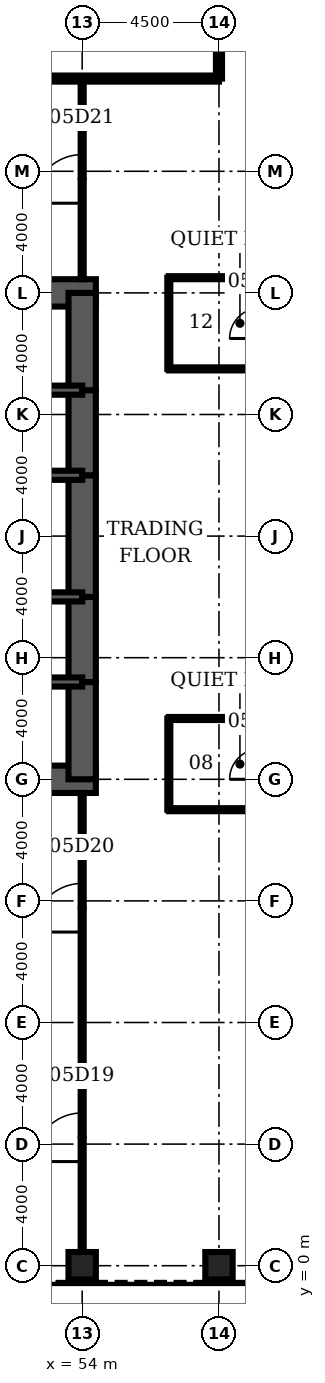
"""IFC4 building model, lengths in metres.
Left out: names, types, materials, properties, quantities, classifications, styles, units other than length and angle.
Written with IfcOpenShell. Run it as: python <this file> out.ifc"""

import sys

from ifc_helpers import new_model, si_unit, direction, frame, frame_2d, origin, origin_2d, place, context, subcontext, project, spatial, rectangle, hollow_rectangle, extrude, element, fill, save


model = new_model("IFC4")
c1 = context("Model", 3, precision=1e-05, world=origin(), true_north=direction((0.0, 1.0)))
c2 = subcontext(c1, "Body", "Model", "MODEL_VIEW")
j1 = project(units=[si_unit("LENGTHUNIT", "METRE"), si_unit("PLANEANGLEUNIT", "RADIAN")], contexts=[c1])
p1 = place(None, origin())
s1 = spatial("IfcSite", under=j1, at=p1, CompositionType="ELEMENT")
p2 = place(p1, origin())
s2 = spatial("IfcBuilding", under=s1, at=p2, CompositionType="ELEMENT")
p3 = place(p2, frame((0.0, 0.0, 27.5)))
s3 = spatial("IfcBuildingStorey", under=s2, at=p3, CompositionType="ELEMENT", Elevation=27.5)
for number, where, z_axis, x_axis in (
    (1, (54.0, 0.0, 0.0), (0.0, 0.0, 1.0), (0.0, 1.0, 0.0)),
    (2, (58.5, 0.0, 0.0), (0.0, 0.0, 1.0), (0.0, 1.0, 0.0)),
):
    element("IfcColumn", number, at=place(p3, frame(where, z_axis=z_axis, x_axis=x_axis)), inside=s3, PredefinedType="COLUMN", context=c2, shape_type="SweptSolid", body=[
        extrude(hollow_rectangle(XDim=0.9, YDim=0.9, WallThickness=0.12, at=origin_2d()), origin(), (0.0, 0.0, 1.0), 4.5),
    ])
for number, where, z_axis, x_axis in (
    (3, (45.0, 16.0, 0.0), (0.0, 0.0, 1.0), (1.0, 0.0, 0.0)),
    (4, (54.45, 32.0, 0.0), (0.0, 0.0, 1.0), (-1.0, 0.0, 0.0)),
):
    element("IfcWall", number, at=place(p3, frame(where, z_axis=z_axis, x_axis=x_axis)), inside=s3, PredefinedType="SHEAR", context=c2, shape_type="SweptSolid", body=[
        extrude(rectangle(XDim=9.45, YDim=0.9, at=frame_2d((4.725, 0.0))), origin(), (0.0, 0.0, 1.0), 4.5),
    ])
p4 = place(p3, frame((54.0, 16.0, 0.0), z_axis=(0.0, 0.0, 1.0), x_axis=(0.0, 1.0, 0.0)))
e5 = element("IfcWall", 5, at=p4, inside=s3, PredefinedType="SHEAR", context=c2, shape_type="SweptSolid", body=[
    extrude(rectangle(XDim=3.2, YDim=0.9, at=frame_2d((1.6, 0.0))), origin(), (0.0, 0.0, 1.0), 4.5),
])
p5 = place(p3, frame((54.0, 19.2, 0.0), z_axis=(0.0, 0.0, 1.0), x_axis=(0.0, 1.0, 0.0)))
e6 = element("IfcWall", 6, at=p5, inside=s3, PredefinedType="SHEAR", context=c2, shape_type="SweptSolid", body=[
    extrude(rectangle(XDim=2.8, YDim=0.9, at=frame_2d((1.4, 0.0))), origin(), (0.0, 0.0, 1.0), 4.5),
])
p6 = place(p5, frame((0.4, 0.0, 0.0)))
e7 = element("IfcOpeningElement", 7, at=p6, cuts=e6, PredefinedType="OPENING", context=c2, shape_type="SweptSolid", body=[
    extrude(rectangle(XDim=1.8, YDim=2.1, at=frame_2d((0.9, 1.05))), frame((0.0, 0.46, 0.0), z_axis=(0.0, -1.0, 0.0), x_axis=(1.0, 0.0, 0.0)), (0.0, 0.0, 1.0), 0.92),
])
p7 = place(p3, frame((54.0, 22.0, 0.0), z_axis=(0.0, 0.0, 1.0), x_axis=(0.0, 1.0, 0.0)))
e8 = element("IfcWall", 8, at=p7, inside=s3, PredefinedType="SHEAR", context=c2, shape_type="SweptSolid", body=[
    extrude(rectangle(XDim=4.0, YDim=0.9, at=frame_2d((2.0, 0.0))), origin(), (0.0, 0.0, 1.0), 4.5),
])
p8 = place(p3, frame((54.0, 26.0, 0.0), z_axis=(0.0, 0.0, 1.0), x_axis=(0.0, 1.0, 0.0)))
e9 = element("IfcWall", 9, at=p8, inside=s3, PredefinedType="SHEAR", context=c2, shape_type="SweptSolid", body=[
    extrude(rectangle(XDim=2.8, YDim=0.9, at=frame_2d((1.4, 0.0))), origin(), (0.0, 0.0, 1.0), 4.5),
])
p9 = place(p8, frame((0.6, 0.0, 0.0)))
e10 = element("IfcOpeningElement", 10, at=p9, cuts=e9, PredefinedType="OPENING", context=c2, shape_type="SweptSolid", body=[
    extrude(rectangle(XDim=1.8, YDim=2.1, at=frame_2d((0.9, 1.05))), frame((0.0, 0.46, 0.0), z_axis=(0.0, -1.0, 0.0), x_axis=(1.0, 0.0, 0.0)), (0.0, 0.0, 1.0), 0.92),
])
p10 = place(p3, frame((54.0, 28.8, 0.0), z_axis=(0.0, 0.0, 1.0), x_axis=(0.0, 1.0, 0.0)))
e11 = element("IfcWall", 11, at=p10, inside=s3, PredefinedType="SHEAR", context=c2, shape_type="SweptSolid", body=[
    extrude(rectangle(XDim=3.2, YDim=0.9, at=frame_2d((1.6, 0.0))), origin(), (0.0, 0.0, 1.0), 4.5),
])
p11 = place(p3, frame((45.0, 19.2, 0.0), z_axis=(0.0, 0.0, 1.0), x_axis=(1.0, 0.0, 0.0)))
e12 = element("IfcWall", 12, at=p11, inside=s3, PredefinedType="SOLIDWALL", context=c2, shape_type="SweptSolid", body=[
    extrude(rectangle(XDim=9.0, YDim=0.3, at=frame_2d((4.5, 0.0))), origin(), (0.0, 0.0, 1.0), 4.5),
])
p12 = place(p11, frame((7.35, 0.0, 0.0)))
e13 = element("IfcOpeningElement", 13, at=p12, cuts=e12, PredefinedType="OPENING", context=c2, shape_type="SweptSolid", body=[
    extrude(rectangle(XDim=1.0, YDim=2.1, at=frame_2d((0.5, 1.05))), frame((0.0, 0.16, 0.0), z_axis=(0.0, -1.0, 0.0), x_axis=(1.0, 0.0, 0.0)), (0.0, 0.0, 1.0), 0.32),
])
p13 = place(p3, frame((45.0, 28.8, 0.0), z_axis=(0.0, 0.0, 1.0), x_axis=(1.0, 0.0, 0.0)))
e14 = element("IfcWall", 14, at=p13, inside=s3, PredefinedType="SOLIDWALL", context=c2, shape_type="SweptSolid", body=[
    extrude(rectangle(XDim=9.0, YDim=0.3, at=frame_2d((4.5, 0.0))), origin(), (0.0, 0.0, 1.0), 4.5),
])
p14 = place(p13, frame((7.35, 0.0, 0.0)))
e15 = element("IfcOpeningElement", 15, at=p14, cuts=e14, PredefinedType="OPENING", context=c2, shape_type="SweptSolid", body=[
    extrude(rectangle(XDim=1.0, YDim=2.1, at=frame_2d((0.5, 1.05))), frame((0.0, 0.16, 0.0), z_axis=(0.0, -1.0, 0.0), x_axis=(1.0, 0.0, 0.0)), (0.0, 0.0, 1.0), 0.32),
])
p15 = place(p3, frame((48.0, 22.0, 0.0), z_axis=(0.0, 0.0, 1.0), x_axis=(1.0, 0.0, 0.0)))
e16 = element("IfcWall", 16, at=p15, inside=s3, PredefinedType="SOLIDWALL", context=c2, shape_type="SweptSolid", body=[
    extrude(rectangle(XDim=6.0, YDim=0.3, at=frame_2d((3.0, 0.0))), origin(), (0.0, 0.0, 1.0), 4.5),
])
p16 = place(p15, frame((2.0, 0.0, 0.0)))
e17 = element("IfcOpeningElement", 17, at=p16, cuts=e16, PredefinedType="OPENING", context=c2, shape_type="SweptSolid", body=[
    extrude(rectangle(XDim=1.0, YDim=2.1, at=frame_2d((0.5, 1.05))), frame((0.0, 0.16, 0.0), z_axis=(0.0, -1.0, 0.0), x_axis=(1.0, 0.0, 0.0)), (0.0, 0.0, 1.0), 0.32),
])
p17 = place(p15, frame((4.3, 0.0, 0.0)))
e18 = element("IfcOpeningElement", 18, at=p17, cuts=e16, PredefinedType="OPENING", context=c2, shape_type="SweptSolid", body=[
    extrude(rectangle(XDim=1.0, YDim=2.1, at=frame_2d((0.5, 1.05))), frame((0.0, 0.16, 0.0), z_axis=(0.0, -1.0, 0.0), x_axis=(1.0, 0.0, 0.0)), (0.0, 0.0, 1.0), 0.32),
])
p18 = place(p3, frame((48.0, 26.0, 0.0), z_axis=(0.0, 0.0, 1.0), x_axis=(1.0, 0.0, 0.0)))
e19 = element("IfcWall", 19, at=p18, inside=s3, PredefinedType="SOLIDWALL", context=c2, shape_type="SweptSolid", body=[
    extrude(rectangle(XDim=6.0, YDim=0.3, at=frame_2d((3.0, 0.0))), origin(), (0.0, 0.0, 1.0), 4.5),
])
for number, where, z_axis, x_axis in (
    (20, (56.85, 15.0, 0.0), (0.0, 0.0, 1.0), (1.0, 0.0, 0.0)),
    (21, (56.85, 18.0, 0.0), (0.0, 0.0, 1.0), (1.0, 0.0, 0.0)),
    (22, (56.85, 29.5, 0.0), (0.0, 0.0, 1.0), (1.0, 0.0, 0.0)),
    (23, (56.85, 32.5, 0.0), (0.0, 0.0, 1.0), (1.0, 0.0, 0.0)),
):
    element("IfcWall", number, at=place(p3, frame(where, z_axis=z_axis, x_axis=x_axis)), inside=s3, PredefinedType="PARTITIONING", context=c2, shape_type="SweptSolid", body=[
        extrude(rectangle(XDim=3.0, YDim=0.1, at=frame_2d((1.5, 0.0))), origin(), (0.0, 0.0, 1.0), 3.0),
    ])
p19 = place(p3, frame((49.5, 39.05, 0.0), z_axis=(0.0, 0.0, 1.0), x_axis=(1.0, 0.0, 0.0)))
e24 = element("IfcWall", 24, at=p19, inside=s3, PredefinedType="PARTITIONING", context=c2, shape_type="SweptSolid", body=[
    extrude(rectangle(XDim=9.0, YDim=0.2, at=frame_2d((4.5, 0.0))), origin(), (0.0, 0.0, 1.0), 3.0),
])
p20 = place(p19, frame((0.45, 0.0, 0.0)))
e25 = element("IfcOpeningElement", 25, at=p20, cuts=e24, PredefinedType="OPENING", context=c2, shape_type="SweptSolid", body=[
    extrude(rectangle(XDim=1.6, YDim=2.1, at=frame_2d((0.8, 1.05))), frame((0.0, 0.11, 0.0), z_axis=(0.0, -1.0, 0.0), x_axis=(1.0, 0.0, 0.0)), (0.0, 0.0, 1.0), 0.22),
])
p21 = place(p3, frame((54.0, 0.45, 0.0), z_axis=(0.0, 0.0, 1.0), x_axis=(0.0, 1.0, 0.0)))
e26 = element("IfcWall", 26, at=p21, inside=s3, PredefinedType="PARTITIONING", context=c2, shape_type="SweptSolid", body=[
    extrude(rectangle(XDim=15.1, YDim=0.1, at=frame_2d((7.55, 0.0))), origin(), (0.0, 0.0, 1.0), 3.0),
])
p22 = place(p21, frame((2.975, 0.0, 0.0)))
e27 = element("IfcOpeningElement", 27, at=p22, cuts=e26, PredefinedType="OPENING", context=c2, shape_type="SweptSolid", body=[
    extrude(rectangle(XDim=1.6, YDim=2.1, at=frame_2d((0.8, 1.05))), frame((0.0, 0.06, 0.0), z_axis=(0.0, -1.0, 0.0), x_axis=(1.0, 0.0, 0.0)), (0.0, 0.0, 1.0), 0.12),
])
p23 = place(p21, frame((10.525, 0.0, 0.0)))
e28 = element("IfcOpeningElement", 28, at=p23, cuts=e26, PredefinedType="OPENING", context=c2, shape_type="SweptSolid", body=[
    extrude(rectangle(XDim=1.6, YDim=2.1, at=frame_2d((0.8, 1.05))), frame((0.0, 0.06, 0.0), z_axis=(0.0, -1.0, 0.0), x_axis=(1.0, 0.0, 0.0)), (0.0, 0.0, 1.0), 0.12),
])
p24 = place(p3, frame((54.0, 32.45, 0.0), z_axis=(0.0, 0.0, 1.0), x_axis=(0.0, 1.0, 0.0)))
e29 = element("IfcWall", 29, at=p24, inside=s3, PredefinedType="PARTITIONING", context=c2, shape_type="SweptSolid", body=[
    extrude(rectangle(XDim=6.6, YDim=0.1, at=frame_2d((3.3, 0.0))), origin(), (0.0, 0.0, 1.0), 3.0),
])
p25 = place(p24, frame((2.5, 0.0, 0.0)))
e30 = element("IfcOpeningElement", 30, at=p25, cuts=e29, PredefinedType="OPENING", context=c2, shape_type="SweptSolid", body=[
    extrude(rectangle(XDim=1.6, YDim=2.1, at=frame_2d((0.8, 1.05))), frame((0.0, 0.06, 0.0), z_axis=(0.0, -1.0, 0.0), x_axis=(1.0, 0.0, 0.0)), (0.0, 0.0, 1.0), 0.12),
])
for number, where, z_axis, x_axis in (
    (31, (56.85, 15.0, 0.0), (0.0, 0.0, 1.0), (0.0, 1.0, 0.0)),
    (32, (56.85, 29.5, 0.0), (0.0, 0.0, 1.0), (0.0, 1.0, 0.0)),
):
    element("IfcWall", number, at=place(p3, frame(where, z_axis=z_axis, x_axis=x_axis)), inside=s3, PredefinedType="PARTITIONING", context=c2, shape_type="SweptSolid", body=[
        extrude(rectangle(XDim=3.0, YDim=0.1, at=frame_2d((1.5, 0.0))), origin(), (0.0, 0.0, 1.0), 3.0),
    ])
p26 = place(p3, frame((58.5, 39.05, 0.0), z_axis=(0.0, 0.0, 1.0), x_axis=(0.0, 1.0, 0.0)))
e33 = element("IfcWall", 33, at=p26, inside=s3, PredefinedType="PARTITIONING", context=c2, shape_type="SweptSolid", body=[
    extrude(rectangle(XDim=6.5, YDim=0.2, at=frame_2d((3.25, 0.0))), origin(), (0.0, 0.0, 1.0), 3.0),
])
p27 = place(p22, origin())
e34 = element("IfcDoor", 34, at=p27, inside=s3, OperationType="SINGLE_SWING_LEFT", PredefinedType="DOOR", context=c2, shape_type="SweptSolid", body=[
    extrude(rectangle(XDim=1.6, YDim=2.1, at=frame_2d((0.8, 1.05))), frame((0.0, 0.025, 0.0), z_axis=(0.0, -1.0, 0.0), x_axis=(1.0, 0.0, 0.0)), (0.0, 0.0, 1.0), 0.05),
])
fill(e27, e34)
p28 = place(p23, origin())
e35 = element("IfcDoor", 35, at=p28, inside=s3, OperationType="SINGLE_SWING_LEFT", PredefinedType="DOOR", context=c2, shape_type="SweptSolid", body=[
    extrude(rectangle(XDim=1.6, YDim=2.1, at=frame_2d((0.8, 1.05))), frame((0.0, 0.025, 0.0), z_axis=(0.0, -1.0, 0.0), x_axis=(1.0, 0.0, 0.0)), (0.0, 0.0, 1.0), 0.05),
])
fill(e28, e35)
p29 = place(p25, origin())
e36 = element("IfcDoor", 36, at=p29, inside=s3, OperationType="SINGLE_SWING_LEFT", PredefinedType="DOOR", context=c2, shape_type="SweptSolid", body=[
    extrude(rectangle(XDim=1.6, YDim=2.1, at=frame_2d((0.8, 1.05))), frame((0.0, 0.025, 0.0), z_axis=(0.0, -1.0, 0.0), x_axis=(1.0, 0.0, 0.0)), (0.0, 0.0, 1.0), 0.05),
])
fill(e30, e36)
p30 = place(p12, origin())
e37 = element("IfcDoor", 37, at=p30, inside=s3, OperationType="SINGLE_SWING_RIGHT", PredefinedType="DOOR", context=c2, shape_type="SweptSolid", body=[
    extrude(rectangle(XDim=1.0, YDim=2.1, at=frame_2d((0.5, 1.05))), frame((0.0, 0.025, 0.0), z_axis=(0.0, -1.0, 0.0), x_axis=(1.0, 0.0, 0.0)), (0.0, 0.0, 1.0), 0.05),
])
fill(e13, e37)
p31 = place(p14, origin())
e38 = element("IfcDoor", 38, at=p31, inside=s3, OperationType="SINGLE_SWING_RIGHT", PredefinedType="DOOR", context=c2, shape_type="SweptSolid", body=[
    extrude(rectangle(XDim=1.0, YDim=2.1, at=frame_2d((0.5, 1.05))), frame((0.0, 0.025, 0.0), z_axis=(0.0, -1.0, 0.0), x_axis=(1.0, 0.0, 0.0)), (0.0, 0.0, 1.0), 0.05),
])
fill(e15, e38)
p32 = place(p6, origin())
e39 = element("IfcDoor", 39, at=p32, inside=s3, OperationType="SINGLE_SWING_LEFT", PredefinedType="DOOR", context=c2, shape_type="SweptSolid", body=[
    extrude(rectangle(XDim=1.8, YDim=2.1, at=frame_2d((0.9, 1.05))), frame((0.0, 0.45, 0.0), z_axis=(0.0, -1.0, 0.0), x_axis=(1.0, 0.0, 0.0)), (0.0, 0.0, 1.0), 0.899),
])
fill(e7, e39)
p33 = place(p9, origin())
e40 = element("IfcDoor", 40, at=p33, inside=s3, OperationType="SINGLE_SWING_LEFT", PredefinedType="DOOR", context=c2, shape_type="SweptSolid", body=[
    extrude(rectangle(XDim=1.8, YDim=2.1, at=frame_2d((0.9, 1.05))), frame((0.0, 0.45, 0.0), z_axis=(0.0, -1.0, 0.0), x_axis=(1.0, 0.0, 0.0)), (0.0, 0.0, 1.0), 0.899),
])
fill(e10, e40)
p34 = place(p17, origin())
e41 = element("IfcDoor", 41, at=p34, inside=s3, OperationType="SINGLE_SWING_RIGHT", PredefinedType="DOOR", context=c2, shape_type="SweptSolid", body=[
    extrude(rectangle(XDim=1.0, YDim=2.1, at=frame_2d((0.5, 1.05))), frame((0.0, 0.025, 0.0), z_axis=(0.0, -1.0, 0.0), x_axis=(1.0, 0.0, 0.0)), (0.0, 0.0, 1.0), 0.05),
])
fill(e18, e41)
save(model, sys.argv[1])
